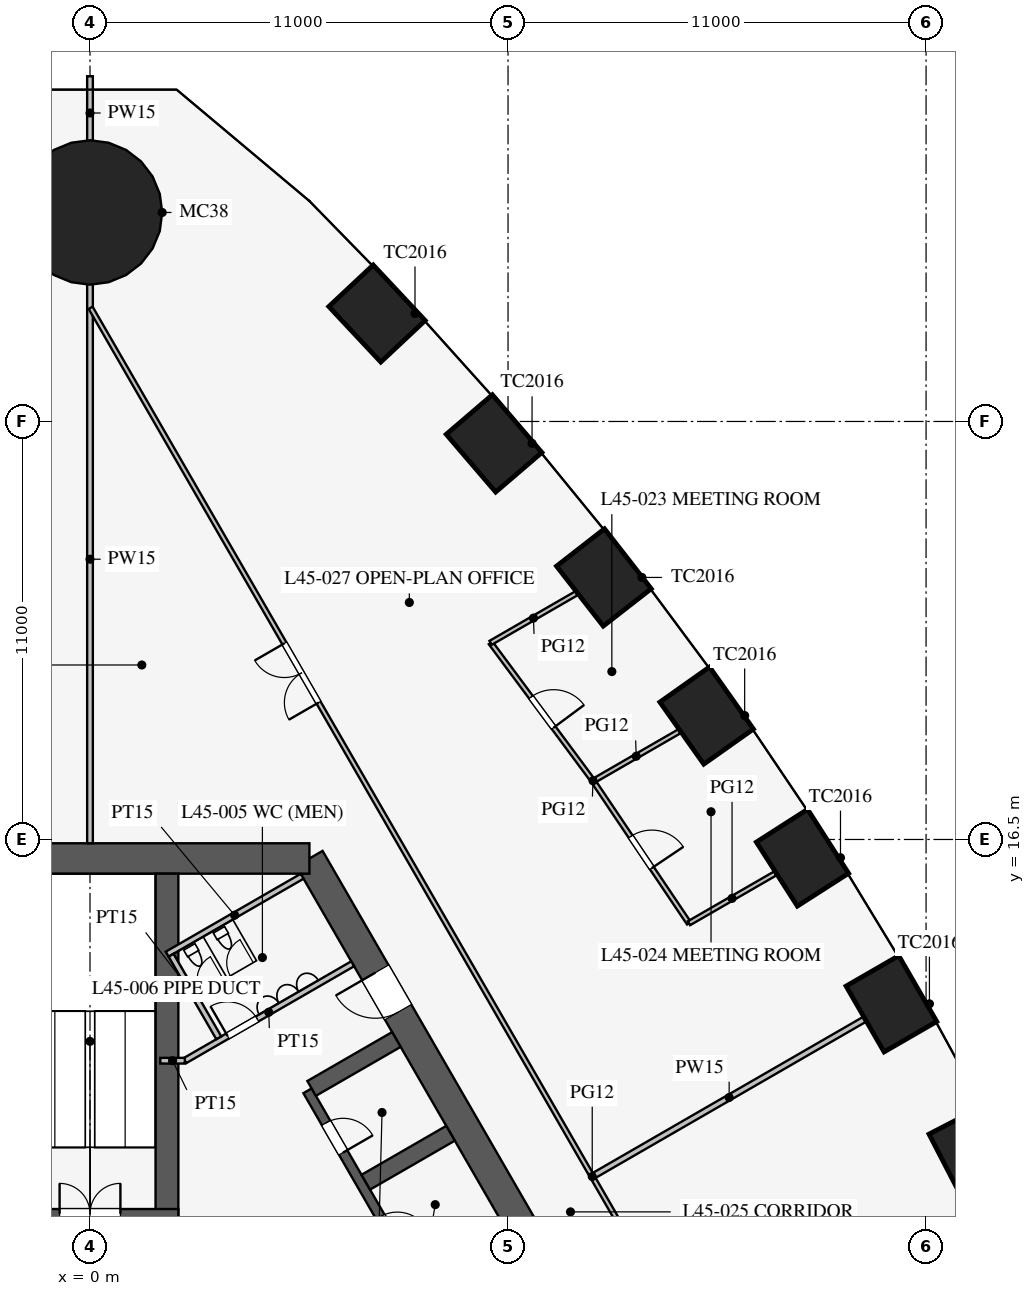
"""IFC4 building model, lengths in metres.
Left out: names, types, materials, properties, quantities, classifications, styles, units other than length and angle.
Written with IfcOpenShell. Run it as: python <this file> out.ifc"""

import sys

from ifc_helpers import new_model, si_unit, direction, frame, frame_2d, origin, origin_2d, place, context, subcontext, project, spatial, rectangle, circle, extrude, element, fill, save


model = new_model("IFC4")
c1 = context("Model", 3, precision=1e-05, world=origin(), true_north=direction((0.0, 1.0)))
c2 = subcontext(c1, "Body", "Model", "MODEL_VIEW")
j1 = project(units=[si_unit("LENGTHUNIT", "METRE"), si_unit("PLANEANGLEUNIT", "RADIAN")], contexts=[c1])
p1 = place(None, origin())
s1 = spatial("IfcSite", under=j1, at=p1, CompositionType="ELEMENT")
p2 = place(p1, origin())
s2 = spatial("IfcBuilding", under=s1, at=p2, CompositionType="ELEMENT")
p3 = place(p2, frame((0.0, 0.0, 198.1)))
s3 = spatial("IfcBuildingStorey", under=s2, at=p3, CompositionType="ELEMENT", Elevation=198.1)
for number, where, z_axis, x_axis in (
    (1, (23.248, 8.226, 0.0), (0.0, 0.0, 1.0), (-0.46, 0.888, 0.0)),
    (2, (21.088, 12.175, 0.0), (0.0, 0.0, 1.0), (-0.5, 0.866, 0.0)),
    (3, (18.748, 16.02, 0.0), (0.0, 0.0, 1.0), (-0.539, 0.842, 0.0)),
    (4, (16.227, 19.761, 0.0), (0.0, 0.0, 1.0), (-0.577, 0.816, 0.0)),
    (5, (13.522, 23.396, 0.0), (0.0, 0.0, 1.0), (-0.615, 0.789, 0.0)),
    (6, (10.632, 26.923, 0.0), (0.0, 0.0, 1.0), (-0.651, 0.759, 0.0)),
    (7, (7.552, 30.341, 0.0), (0.0, 0.0, 1.0), (-0.684, 0.73, 0.0)),
):
    element("IfcColumn", number, at=place(p3, frame(where, z_axis=z_axis, x_axis=x_axis)), inside=s3, PredefinedType="COLUMN", context=c2, shape_type="SweptSolid", body=[
        extrude(rectangle(XDim=2.0, YDim=1.6, at=origin_2d()), origin(), (0.0, 0.0, 1.0), 4.2),
    ])
p4 = place(p3, frame((0.0, 33.0, 0.0), z_axis=(0.0, 0.0, 1.0), x_axis=(1.0, 0.0, 0.0)))
e8 = element("IfcColumn", 8, at=p4, inside=s3, PredefinedType="COLUMN", context=c2, shape_type="SweptSolid", body=[
    extrude(circle(Radius=1.9, at=origin_2d()), origin(), (0.0, 0.0, 1.0), 4.2),
])
p5 = place(p3, frame((16.743, -3.0, 0.0), z_axis=(0.0, 0.0, 1.0), x_axis=(-0.500002442456, 0.866023993627, 0.0)))
e9 = element("IfcWall", 9, at=p5, inside=s3, PredefinedType="SHEAR", context=c2, shape_type="SweptSolid", body=[
    extrude(rectangle(XDim=21.939, YDim=0.8, at=frame_2d((10.97, 0.0))), origin(), (0.0, 0.0, 1.0), 4.2),
])
p6 = place(p5, frame((17.27, 0.0, 0.0)))
e10 = element("IfcOpeningElement", 10, at=p6, cuts=e9, PredefinedType="OPENING", context=c2, shape_type="SweptSolid", body=[
    extrude(rectangle(XDim=1.2, YDim=2.1, at=frame_2d((0.6, 1.05))), frame((0.0, 0.41, 0.0), z_axis=(0.0, -1.0, 0.0), x_axis=(1.0, 0.0, 0.0)), (0.0, 0.0, 1.0), 0.82),
])
p7 = place(p5, frame((3.47, 0.0, 0.0)))
e11 = element("IfcOpeningElement", 11, at=p7, cuts=e9, PredefinedType="OPENING", context=c2, shape_type="SweptSolid", body=[
    extrude(rectangle(XDim=1.2, YDim=2.1, at=frame_2d((0.6, 1.05))), frame((0.0, 0.41, 0.0), z_axis=(0.0, -1.0, 0.0), x_axis=(1.0, 0.0, 0.0)), (0.0, 0.0, 1.0), 0.82),
])
p8 = place(p3, frame((5.773, 16.0, 0.0), z_axis=(0.0, 0.0, 1.0), x_axis=(-1.0, 0.0, 0.0)))
e12 = element("IfcWall", 12, at=p8, inside=s3, PredefinedType="SHEAR", context=c2, shape_type="SweptSolid", body=[
    extrude(rectangle(XDim=11.547, YDim=0.8, at=frame_2d((5.773, 0.0))), origin(), (0.0, 0.0, 1.0), 4.2),
])
p9 = place(p3, frame((11.424, 0.014, 0.0), z_axis=(0.0, 0.0, 1.0), x_axis=(-0.500001763848, 0.866024385424, 0.0)))
e13 = element("IfcWall", 13, at=p9, inside=s3, PredefinedType="SHEAR", context=c2, shape_type="SweptSolid", body=[
    extrude(rectangle(XDim=11.4, YDim=0.25, at=frame_2d((5.7, 0.0))), origin(), (0.0, 0.0, 1.0), 4.2),
])
p10 = place(p9, frame((0.975, 0.0, 0.0)))
e14 = element("IfcOpeningElement", 14, at=p10, cuts=e13, PredefinedType="OPENING", context=c2, shape_type="SweptSolid", body=[
    extrude(rectangle(XDim=0.9, YDim=2.1, at=frame_2d((0.45, 1.05))), frame((0.0, 0.135, 0.0), z_axis=(0.0, -1.0, 0.0), x_axis=(1.0, 0.0, 0.0)), (0.0, 0.0, 1.0), 0.27),
])
p11 = place(p9, frame((3.825, 0.0, 0.0)))
e15 = element("IfcOpeningElement", 15, at=p11, cuts=e13, PredefinedType="OPENING", context=c2, shape_type="SweptSolid", body=[
    extrude(rectangle(XDim=0.9, YDim=2.1, at=frame_2d((0.45, 1.05))), frame((0.0, 0.135, 0.0), z_axis=(0.0, -1.0, 0.0), x_axis=(1.0, 0.0, 0.0)), (0.0, 0.0, 1.0), 0.27),
])
p12 = place(p9, frame((6.675, 0.0, 0.0)))
e16 = element("IfcOpeningElement", 16, at=p12, cuts=e13, PredefinedType="OPENING", context=c2, shape_type="SweptSolid", body=[
    extrude(rectangle(XDim=0.9, YDim=2.1, at=frame_2d((0.45, 1.05))), frame((0.0, 0.135, 0.0), z_axis=(0.0, -1.0, 0.0), x_axis=(1.0, 0.0, 0.0)), (0.0, 0.0, 1.0), 0.27),
])
p13 = place(p9, frame((9.525, 0.0, 0.0)))
e17 = element("IfcOpeningElement", 17, at=p13, cuts=e13, PredefinedType="OPENING", context=c2, shape_type="SweptSolid", body=[
    extrude(rectangle(XDim=0.9, YDim=2.1, at=frame_2d((0.45, 1.05))), frame((0.0, 0.135, 0.0), z_axis=(0.0, -1.0, 0.0), x_axis=(1.0, 0.0, 0.0)), (0.0, 0.0, 1.0), 0.27),
])
p14 = place(p3, frame((7.257, 7.481, 0.0), z_axis=(0.0, 0.0, 1.0), x_axis=(0.866046643894, 0.499963209246, 0.0)))
e18 = element("IfcWall", 18, at=p14, inside=s3, PredefinedType="SHEAR", context=c2, shape_type="SweptSolid", body=[
    extrude(rectangle(XDim=2.575, YDim=0.45, at=frame_2d((1.288, 0.0))), origin(), (0.0, 0.0, 1.0), 4.2),
])
p15 = place(p3, frame((5.832, 9.949, 0.0), z_axis=(0.0, 0.0, 1.0), x_axis=(0.866029291668, 0.499993265928, 0.0)))
e19 = element("IfcWall", 19, at=p15, inside=s3, PredefinedType="SHEAR", context=c2, shape_type="SweptSolid", body=[
    extrude(rectangle(XDim=2.575, YDim=0.45, at=frame_2d((1.288, 0.0))), origin(), (0.0, 0.0, 1.0), 4.2),
])
p16 = place(p3, frame((2.025, 6.525, 0.0), z_axis=(0.0, 0.0, 1.0), x_axis=(0.0, 1.0, 0.0)))
e20 = element("IfcWall", 20, at=p16, inside=s3, PredefinedType="SHEAR", context=c2, shape_type="SweptSolid", body=[
    extrude(rectangle(XDim=9.075, YDim=0.6, at=frame_2d((4.538, 0.0))), origin(), (0.0, 0.0, 1.0), 4.2),
])
p17 = place(p3, frame((2.325, 6.65, 0.0), z_axis=(0.0, 0.0, 1.0), x_axis=(-1.0, 0.0, 0.0)))
e21 = element("IfcWall", 21, at=p17, inside=s3, PredefinedType="SHEAR", context=c2, shape_type="SweptSolid", body=[
    extrude(rectangle(XDim=4.65, YDim=0.25, at=frame_2d((2.325, 0.0))), origin(), (0.0, 0.0, 1.0), 4.2),
])
p18 = place(p17, frame((1.525, 0.0, 0.0)))
e22 = element("IfcOpeningElement", 22, at=p18, cuts=e21, PredefinedType="OPENING", context=c2, shape_type="SweptSolid", body=[
    extrude(rectangle(XDim=1.6, YDim=2.1, at=frame_2d((0.8, 1.05))), frame((0.0, 0.135, 0.0), z_axis=(0.0, -1.0, 0.0), x_axis=(1.0, 0.0, 0.0)), (0.0, 0.0, 1.0), 0.27),
])
p19 = place(p3, frame((2.495, 10.678, 0.0), z_axis=(0.0, 0.0, 1.0), x_axis=(0.86602216432, 0.500005610874, 0.0)))
e23 = element("IfcWall", 23, at=p19, inside=s3, PredefinedType="PARTITIONING", context=c2, shape_type="SweptSolid", body=[
    extrude(rectangle(XDim=5.1, YDim=0.15, at=frame_2d((2.55, 0.0))), origin(), (0.0, 0.0, 1.0), 4.0),
])
p20 = place(p19, frame((1.3, 0.0, 0.0)))
e24 = element("IfcOpeningElement", 24, at=p20, cuts=e23, PredefinedType="OPENING", context=c2, shape_type="SweptSolid", body=[
    extrude(rectangle(XDim=0.9, YDim=2.1, at=frame_2d((0.45, 1.05))), frame((0.0, 0.085, 0.0), z_axis=(0.0, -1.0, 0.0), x_axis=(1.0, 0.0, 0.0)), (0.0, 0.0, 1.0), 0.17),
])
p21 = place(p3, frame((2.495, 10.678, 0.0), z_axis=(0.0, 0.0, 1.0), x_axis=(-1.0, 0.0, 0.0)))
e25 = element("IfcWall", 25, at=p21, inside=s3, PredefinedType="PARTITIONING", context=c2, shape_type="SweptSolid", body=[
    extrude(rectangle(XDim=0.645, YDim=0.15, at=frame_2d((0.323, 0.0))), origin(), (0.0, 0.0, 1.0), 4.0),
])
p22 = place(p3, frame((2.031, 13.482, 0.0), z_axis=(0.0, 0.0, 1.0), x_axis=(0.866050731258, 0.499956128963, 0.0)))
e26 = element("IfcWall", 26, at=p22, inside=s3, PredefinedType="PARTITIONING", context=c2, shape_type="SweptSolid", body=[
    extrude(rectangle(XDim=4.1, YDim=0.15, at=frame_2d((2.05, 0.0))), origin(), (0.0, 0.0, 1.0), 4.0),
])
p23 = place(p3, frame((3.389, 11.281, 0.0), z_axis=(0.0, 0.0, 1.0), x_axis=(-0.499989096993, 0.866031698547, 0.0)))
e27 = element("IfcWall", 27, at=p23, inside=s3, PredefinedType="PARTITIONING", context=c2, shape_type="SweptSolid", body=[
    extrude(rectangle(XDim=2.51, YDim=0.15, at=frame_2d((1.255, 0.0))), origin(), (0.0, 0.0, 1.0), 4.0),
])
p24 = place(p3, frame((0.0, 16.4, 0.0), z_axis=(0.0, 0.0, 1.0), x_axis=(0.0, 1.0, 0.0)))
e28 = element("IfcWall", 28, at=p24, inside=s3, PredefinedType="PARTITIONING", context=c2, shape_type="SweptSolid", body=[
    extrude(rectangle(XDim=14.95, YDim=0.15, at=frame_2d((7.475, 0.0))), origin(), (0.0, 0.0, 1.0), 2.4),
])
p25 = place(p3, frame((0.0, 34.65, 0.0), z_axis=(0.0, 0.0, 1.0), x_axis=(0.0, 1.0, 0.0)))
e29 = element("IfcWall", 29, at=p25, inside=s3, PredefinedType="PARTITIONING", context=c2, shape_type="SweptSolid", body=[
    extrude(rectangle(XDim=1.935, YDim=0.15, at=frame_2d((0.967, 0.0))), origin(), (0.0, 0.0, 1.0), 2.4),
])
p26 = place(p3, frame((13.268, 7.66, 0.0), z_axis=(0.0, 0.0, 1.0), x_axis=(0.866019499219, 0.500010226868, 0.0)))
e30 = element("IfcWall", 30, at=p26, inside=s3, PredefinedType="PARTITIONING", context=c2, shape_type="SweptSolid", body=[
    extrude(rectangle(XDim=8.2, YDim=0.15, at=frame_2d((4.1, 0.0))), origin(), (0.0, 0.0, 1.0), 2.992),
])
p27 = place(p3, frame((26.415, -15.231, 0.0), z_axis=(0.0, 0.0, 1.0), x_axis=(-0.50000091641, 0.866024874695, 0.0)))
e31 = element("IfcWall", 31, at=p27, inside=s3, PredefinedType="PARTITIONING", context=c2, shape_type="SweptSolid", body=[
    extrude(rectangle(XDim=52.796, YDim=0.12, at=frame_2d((26.398, 0.0))), origin(), (0.0, 0.0, 1.0), 2.9),
])
p28 = place(p27, frame((10.2, 0.0, 0.15)))
e32 = element("IfcOpeningElement", 32, at=p28, cuts=e31, PredefinedType="OPENING", context=c2, shape_type="SweptSolid", body=[
    extrude(rectangle(XDim=1.8, YDim=2.1, at=frame_2d((0.9, 1.05))), frame((0.0, 0.07, 0.0), z_axis=(0.0, -1.0, 0.0), x_axis=(1.0, 0.0, 0.0)), (0.0, 0.0, 1.0), 0.14),
])
p29 = place(p27, frame((40.8, 0.0, 0.15)))
e33 = element("IfcOpeningElement", 33, at=p29, cuts=e31, PredefinedType="OPENING", context=c2, shape_type="SweptSolid", body=[
    extrude(rectangle(XDim=1.8, YDim=2.1, at=frame_2d((0.9, 1.05))), frame((0.0, 0.07, 0.0), z_axis=(0.0, -1.0, 0.0), x_axis=(1.0, 0.0, 0.0)), (0.0, 0.0, 1.0), 0.14),
])
p30 = place(p3, frame((15.761, 14.296, 0.0), z_axis=(0.0, 0.0, 1.0), x_axis=(-0.55850386778, 0.829501916619, 0.0)))
e34 = element("IfcWall", 34, at=p30, inside=s3, PredefinedType="PARTITIONING", context=c2, shape_type="SweptSolid", body=[
    extrude(rectangle(XDim=4.511, YDim=0.12, at=frame_2d((2.255, 0.0))), origin(), (0.0, 0.0, 1.0), 2.9),
])
p31 = place(p30, frame((1.75, 0.0, 0.15)))
e35 = element("IfcOpeningElement", 35, at=p31, cuts=e34, PredefinedType="OPENING", context=c2, shape_type="SweptSolid", body=[
    extrude(rectangle(XDim=1.0, YDim=2.1, at=frame_2d((0.5, 1.05))), frame((0.0, 0.07, 0.0), z_axis=(0.0, -1.0, 0.0), x_axis=(1.0, 0.0, 0.0)), (0.0, 0.0, 1.0), 0.14),
])
p32 = place(p3, frame((13.242, 18.037, 0.0), z_axis=(0.0, 0.0, 1.0), x_axis=(-0.596173167565, 0.802855873912, 0.0)))
e36 = element("IfcWall", 36, at=p32, inside=s3, PredefinedType="PARTITIONING", context=c2, shape_type="SweptSolid", body=[
    extrude(rectangle(XDim=4.53, YDim=0.12, at=frame_2d((2.265, 0.0))), origin(), (0.0, 0.0, 1.0), 2.9),
])
p33 = place(p32, frame((1.75, 0.0, 0.15)))
e37 = element("IfcOpeningElement", 37, at=p33, cuts=e36, PredefinedType="OPENING", context=c2, shape_type="SweptSolid", body=[
    extrude(rectangle(XDim=1.0, YDim=2.1, at=frame_2d((0.5, 1.05))), frame((0.0, 0.07, 0.0), z_axis=(0.0, -1.0, 0.0), x_axis=(1.0, 0.0, 0.0)), (0.0, 0.0, 1.0), 0.14),
])
p34 = place(p3, frame((10.541, 21.674, 0.0), z_axis=(0.0, 0.0, 1.0), x_axis=(0.866031051173, 0.499990218309, 0.0)))
e38 = element("IfcWall", 38, at=p34, inside=s3, PredefinedType="PARTITIONING", context=c2, shape_type="SweptSolid", body=[
    extrude(rectangle(XDim=2.604, YDim=0.12, at=frame_2d((1.302, 0.0))), origin(), (0.0, 0.0, 1.0), 2.8),
])
p35 = place(p3, frame((15.761, 14.296, 0.0), z_axis=(0.0, 0.0, 1.0), x_axis=(0.865979045404, 0.500080286476, 0.0)))
e39 = element("IfcWall", 39, at=p35, inside=s3, PredefinedType="PARTITIONING", context=c2, shape_type="SweptSolid", body=[
    extrude(rectangle(XDim=2.618, YDim=0.12, at=frame_2d((1.309, 0.0))), origin(), (0.0, 0.0, 1.0), 2.9),
])
p36 = place(p3, frame((13.242, 18.037, 0.0), z_axis=(0.0, 0.0, 1.0), x_axis=(0.866003542134, 0.500037863578, 0.0)))
e40 = element("IfcWall", 40, at=p36, inside=s3, PredefinedType="PARTITIONING", context=c2, shape_type="SweptSolid", body=[
    extrude(rectangle(XDim=2.613, YDim=0.12, at=frame_2d((1.307, 0.0))), origin(), (0.0, 0.0, 1.0), 2.9),
])
p37 = place(p20, origin())
e41 = element("IfcDoor", 41, at=p37, inside=s3, OperationType="SINGLE_SWING_LEFT", PredefinedType="DOOR", context=c2, shape_type="SweptSolid", body=[
    extrude(rectangle(XDim=0.9, YDim=2.1, at=frame_2d((0.45, 1.05))), frame((0.0, 0.025, 0.0), z_axis=(0.0, -1.0, 0.0), x_axis=(1.0, 0.0, 0.0)), (0.0, 0.0, 1.0), 0.05),
])
fill(e24, e41)
p38 = place(p18, frame((1.6, 0.0, 0.0), z_axis=(0.0, 0.0, 1.0), x_axis=(-1.0, 0.0, 0.0)))
e42 = element("IfcDoor", 42, at=p38, inside=s3, OperationType="DOUBLE_DOOR_SINGLE_SWING", PredefinedType="DOOR", context=c2, shape_type="SweptSolid", body=[
    extrude(rectangle(XDim=1.6, YDim=2.1, at=frame_2d((0.8, 1.05))), frame((0.0, 0.025, 0.0), z_axis=(0.0, -1.0, 0.0), x_axis=(1.0, 0.0, 0.0)), (0.0, 0.0, 1.0), 0.05),
])
fill(e22, e42)
p39 = place(p6, origin())
e43 = element("IfcDoor", 43, at=p39, inside=s3, OperationType="SINGLE_SWING_RIGHT", PredefinedType="DOOR", context=c2, shape_type="SweptSolid", body=[
    extrude(rectangle(XDim=1.2, YDim=2.1, at=frame_2d((0.6, 1.05))), frame((0.0, 0.025, 0.0), z_axis=(0.0, -1.0, 0.0), x_axis=(1.0, 0.0, 0.0)), (0.0, 0.0, 1.0), 0.05),
])
fill(e10, e43)
p40 = place(p13, frame((0.9, 0.0, 0.0), z_axis=(0.0, 0.0, 1.0), x_axis=(-1.0, 0.0, 0.0)))
e44 = element("IfcDoor", 44, at=p40, inside=s3, OperationType="SINGLE_SWING_RIGHT", PredefinedType="DOOR", context=c2, shape_type="SweptSolid", body=[
    extrude(rectangle(XDim=0.9, YDim=2.1, at=frame_2d((0.45, 1.05))), frame((0.0, 0.025, 0.0), z_axis=(0.0, -1.0, 0.0), x_axis=(1.0, 0.0, 0.0)), (0.0, 0.0, 1.0), 0.05),
])
fill(e17, e44)
p41 = place(p33, frame((1.0, 0.0, 0.0), z_axis=(0.0, 0.0, 1.0), x_axis=(-1.0, 0.0, 0.0)))
e45 = element("IfcDoor", 45, at=p41, inside=s3, OperationType="SINGLE_SWING_RIGHT", PredefinedType="DOOR", context=c2, shape_type="SweptSolid", body=[
    extrude(rectangle(XDim=1.0, YDim=2.1, at=frame_2d((0.5, 1.05))), frame((0.0, 0.025, 0.0), z_axis=(0.0, -1.0, 0.0), x_axis=(1.0, 0.0, 0.0)), (0.0, 0.0, 1.0), 0.05),
])
fill(e37, e45)
p42 = place(p31, frame((1.0, 0.0, 0.0), z_axis=(0.0, 0.0, 1.0), x_axis=(-1.0, 0.0, 0.0)))
e46 = element("IfcDoor", 46, at=p42, inside=s3, OperationType="SINGLE_SWING_RIGHT", PredefinedType="DOOR", context=c2, shape_type="SweptSolid", body=[
    extrude(rectangle(XDim=1.0, YDim=2.1, at=frame_2d((0.5, 1.05))), frame((0.0, 0.025, 0.0), z_axis=(0.0, -1.0, 0.0), x_axis=(1.0, 0.0, 0.0)), (0.0, 0.0, 1.0), 0.05),
])
fill(e35, e46)
p43 = place(p29, origin())
e47 = element("IfcDoor", 47, at=p43, inside=s3, OperationType="DOUBLE_DOOR_SINGLE_SWING", PredefinedType="DOOR", context=c2, shape_type="SweptSolid", body=[
    extrude(rectangle(XDim=1.8, YDim=2.1, at=frame_2d((0.9, 1.05))), frame((0.0, 0.025, 0.0), z_axis=(0.0, -1.0, 0.0), x_axis=(1.0, 0.0, 0.0)), (0.0, 0.0, 1.0), 0.05),
])
fill(e33, e47)
save(model, sys.argv[1])
